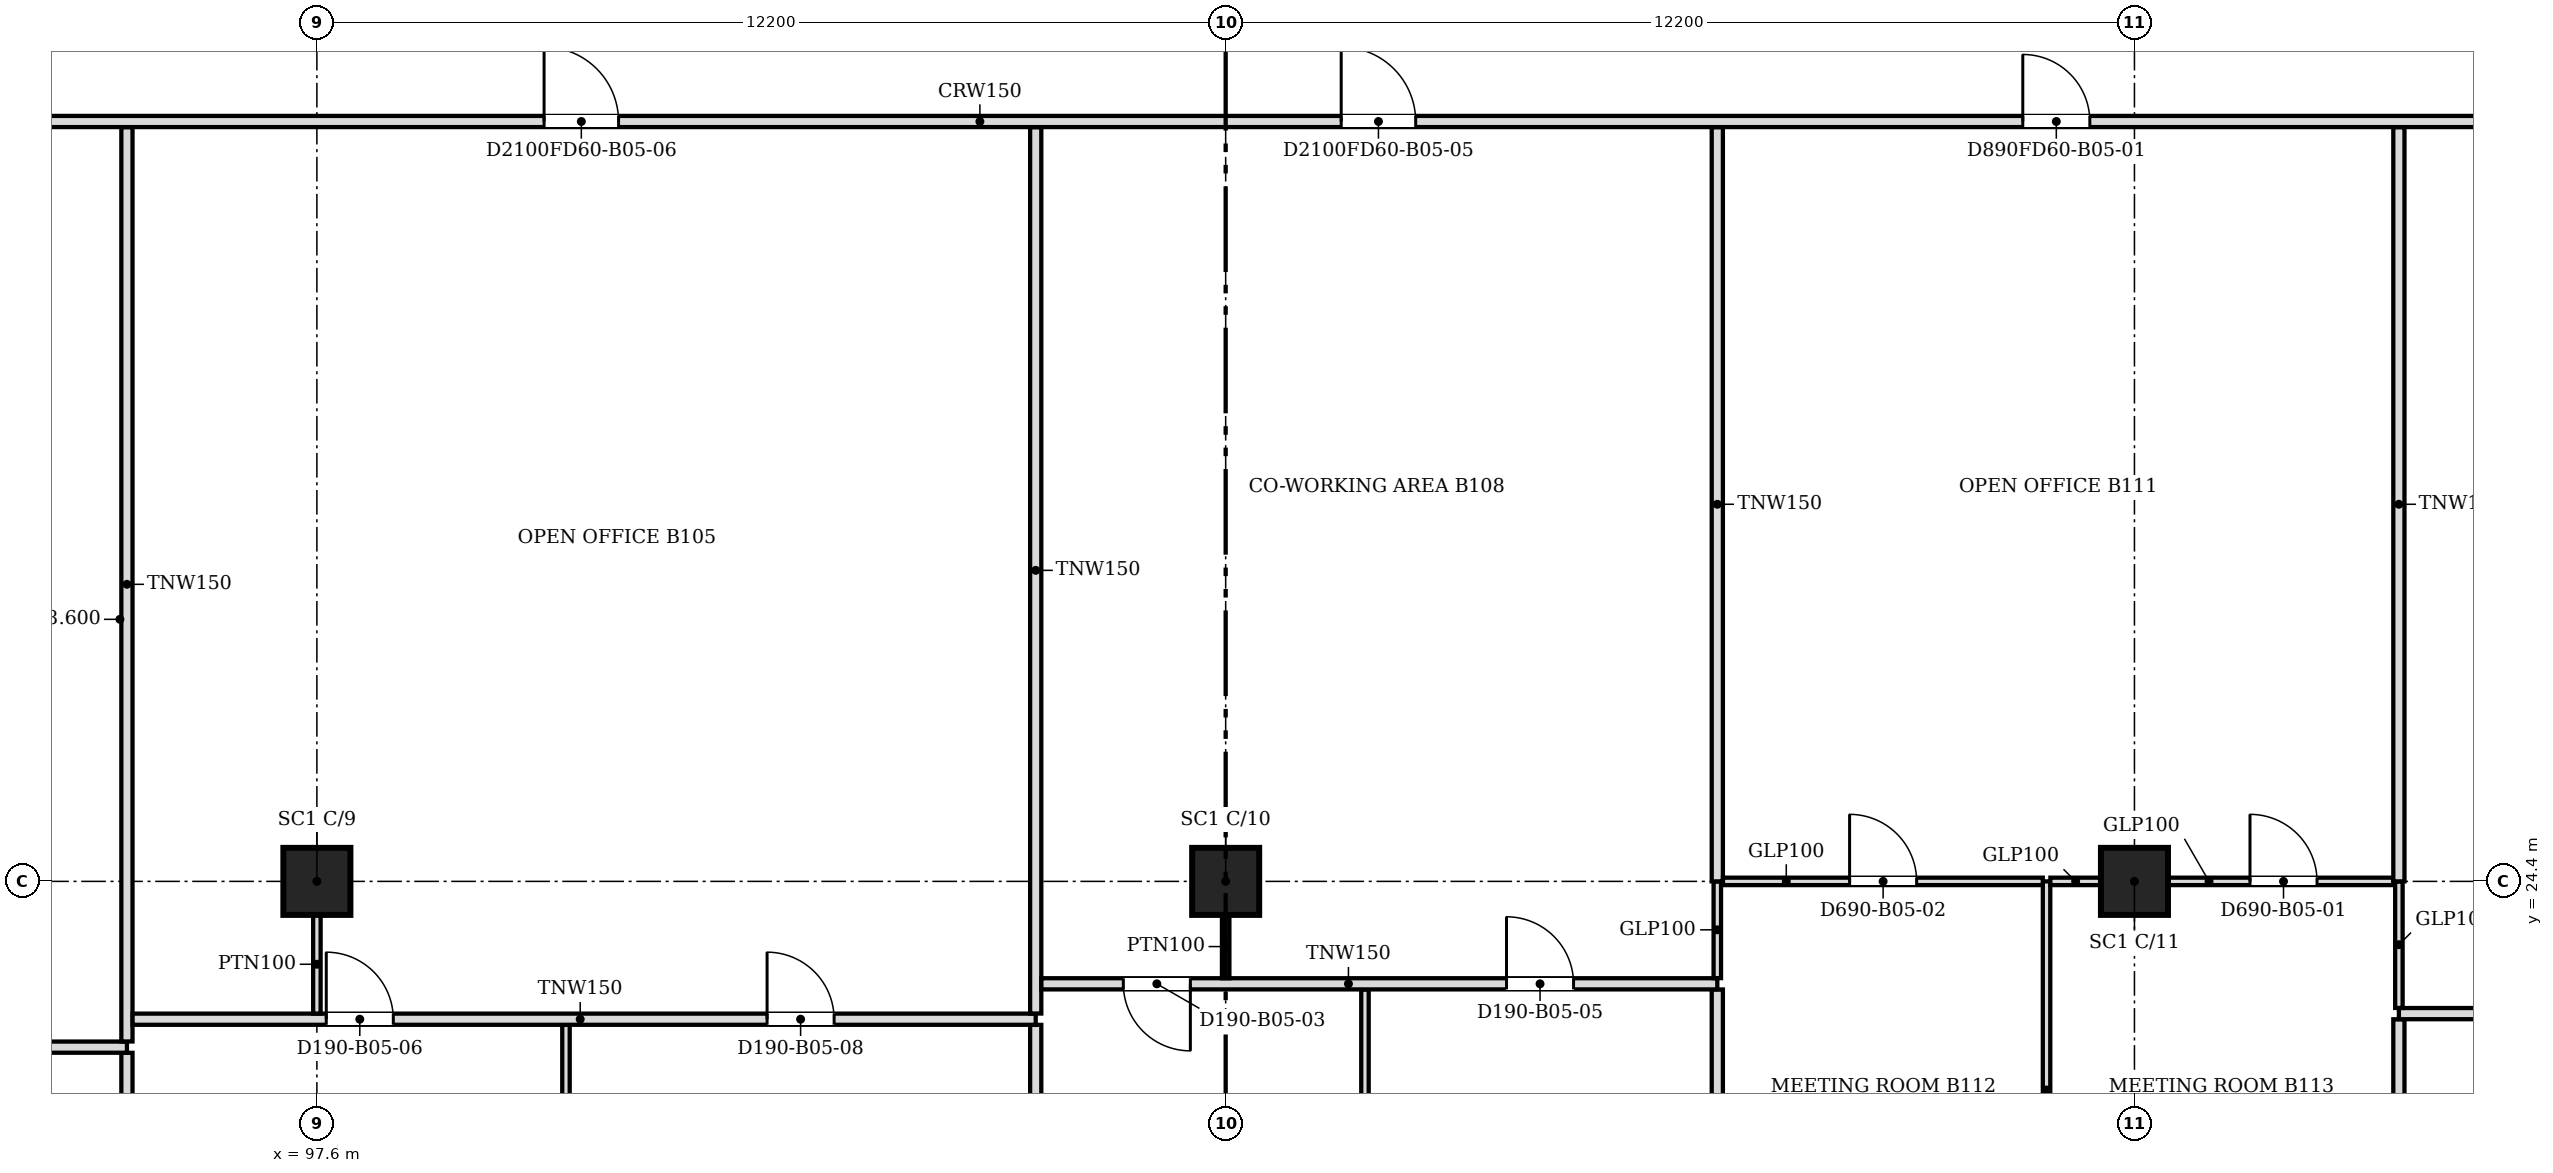
"""IFC4 building model, lengths in metres.
Left out: names, types, materials, properties, quantities, classifications, styles, units other than length and angle.
Written with IfcOpenShell. Run it as: python <this file> out.ifc"""

import sys

from ifc_helpers import new_model, si_unit, direction, frame, frame_2d, origin, origin_2d, place, context, subcontext, project, spatial, rectangle, extrude, source, transform, mapped, element, fill, save


model = new_model("IFC4")
c1 = context("Model", 3, precision=1e-05, world=origin(), true_north=direction((0.0, 1.0)))
c2 = subcontext(c1, "Body", "Model", "MODEL_VIEW")
j1 = project(units=[si_unit("LENGTHUNIT", "METRE"), si_unit("PLANEANGLEUNIT", "RADIAN")], contexts=[c1])
p1 = place(None, origin())
s1 = spatial("IfcSite", under=j1, at=p1, CompositionType="ELEMENT")
p2 = place(p1, origin())
s2 = spatial("IfcBuilding", under=s1, at=p2, CompositionType="ELEMENT")
p3 = place(p2, frame((0.0, 0.0, 48.6)))
s3 = spatial("IfcBuildingStorey", under=s2, at=p3, CompositionType="ELEMENT", Elevation=48.6)
for number, where, z_axis, x_axis in (
    (1, (97.6, 24.4, 0.0), (0.0, 0.0, 1.0), (1.0, 0.0, 0.0)),
    (2, (109.8, 24.4, 0.0), (0.0, 0.0, 1.0), (1.0, 0.0, 0.0)),
    (3, (122.0, 24.4, 0.0), (0.0, 0.0, 1.0), (1.0, 0.0, 0.0)),
):
    element("IfcColumn", number, at=place(p3, frame(where, z_axis=z_axis, x_axis=x_axis)), inside=s3, PredefinedType="COLUMN", context=c2, shape_type="SweptSolid", body=[
        extrude(rectangle(XDim=0.9, YDim=0.9, at=origin_2d()), origin(), (0.0, 0.0, 1.0), 3.6),
    ])
p4 = place(p3, frame((95.05, 18.8, 0.0), z_axis=(0.0, 0.0, 1.0), x_axis=(0.0, 1.0, 0.0)))
e4 = element("IfcWall", 4, at=p4, inside=s3, PredefinedType="PARTITIONING", context=c2, shape_type="SweptSolid", body=[
    extrude(rectangle(XDim=3.299, YDim=0.15, at=frame_2d((1.649, 0.0))), origin(), (0.0, 0.0, 1.0), 3.067),
])
p5 = place(p3, frame((100.944, 18.8, 0.0), z_axis=(0.0, 0.0, 1.0), x_axis=(0.0, 1.0, 0.0)))
e5 = element("IfcWall", 5, at=p5, inside=s3, PredefinedType="PARTITIONING", context=c2, shape_type="SweptSolid", body=[
    extrude(rectangle(XDim=3.674, YDim=0.1, at=frame_2d((1.837, 0.0))), origin(), (0.0, 0.0, 1.0), 3.067),
])
p6 = place(p3, frame((107.25, 18.8, 0.0), z_axis=(0.0, 0.0, 1.0), x_axis=(0.0, 1.0, 0.0)))
e6 = element("IfcWall", 6, at=p6, inside=s3, PredefinedType="PARTITIONING", context=c2, shape_type="SweptSolid", body=[
    extrude(rectangle(XDim=3.674, YDim=0.15, at=frame_2d((1.837, 0.0))), origin(), (0.0, 0.0, 1.0), 3.067),
])
p7 = place(p3, frame((111.67, 18.8, 0.0), z_axis=(0.0, 0.0, 1.0), x_axis=(0.0, 1.0, 0.0)))
e7 = element("IfcWall", 7, at=p7, inside=s3, PredefinedType="PARTITIONING", context=c2, shape_type="SweptSolid", body=[
    extrude(rectangle(XDim=4.149, YDim=0.1, at=frame_2d((2.074, 0.0))), origin(), (0.0, 0.0, 1.0), 3.067),
])
p8 = place(p3, frame((116.4, 18.8, 0.0), z_axis=(0.0, 0.0, 1.0), x_axis=(0.0, 1.0, 0.0)))
e8 = element("IfcWall", 8, at=p8, inside=s3, PredefinedType="PARTITIONING", context=c2, shape_type="SweptSolid", body=[
    extrude(rectangle(XDim=4.149, YDim=0.15, at=frame_2d((2.074, 0.0))), origin(), (0.0, 0.0, 1.0), 3.067),
])
p9 = place(p3, frame((120.82, 18.8, 0.0), z_axis=(0.0, 0.0, 1.0), x_axis=(0.0, 1.0, 0.0)))
e9 = element("IfcWall", 9, at=p9, inside=s3, PredefinedType="PARTITIONING", context=c2, shape_type="SweptSolid", body=[
    extrude(rectangle(XDim=5.6, YDim=0.1, at=frame_2d((2.8, 0.0))), origin(), (0.0, 0.0, 1.0), 3.067),
])
p10 = place(p3, frame((125.55, 18.8, 0.0), z_axis=(0.0, 0.0, 1.0), x_axis=(0.0, 1.0, 0.0)))
e10 = element("IfcWall", 10, at=p10, inside=s3, PredefinedType="PARTITIONING", context=c2, shape_type="SweptSolid", body=[
    extrude(rectangle(XDim=3.749, YDim=0.15, at=frame_2d((1.875, 0.0))), origin(), (0.0, 0.0, 1.0), 3.067),
])
p11 = place(p3, frame((95.05, 22.175, 0.0), z_axis=(0.0, 0.0, 1.0), x_axis=(-1.0, 0.0, 0.0)))
e11 = element("IfcWall", 11, at=p11, inside=s3, PredefinedType="PARTITIONING", context=c2, shape_type="SweptSolid", body=[
    extrude(rectangle(XDim=8.256, YDim=0.15, at=frame_2d((4.128, 0.0))), origin(), (0.0, 0.0, 1.0), 3.067),
])
m1 = source(origin(), c2, "Body", "SweptSolid", [
    extrude(rectangle(XDim=0.9, YDim=2.1, at=frame_2d((0.45, 1.05))), frame((0.0, 0.085, 0.0), z_axis=(0.0, -1.0, 0.0), x_axis=(1.0, 0.0, 0.0)), (0.0, 0.0, 1.0), 0.17),
])
p12 = place(p11, frame((6.056, 0.0, 0.0)))
e12 = element("IfcOpeningElement", 12, at=p12, cuts=e11, PredefinedType="OPENING", context=c2, shape_type="MappedRepresentation", body=[
    mapped(m1, transform((0.0, 0.0, 0.0), scale=1.0)),
])
p13 = place(p11, frame((1.93, 0.0, 0.0)))
e13 = element("IfcOpeningElement", 13, at=p13, cuts=e11, PredefinedType="OPENING", context=c2, shape_type="MappedRepresentation", body=[
    mapped(m1, transform((0.0, 0.0, 0.0), scale=1.0)),
])
p14 = place(p3, frame((95.05, 22.251, 0.0), z_axis=(0.0, 0.0, 1.0), x_axis=(0.0, 1.0, 0.0)))
e14 = element("IfcWall", 14, at=p14, inside=s3, PredefinedType="PARTITIONING", context=c2, shape_type="SweptSolid", body=[
    extrude(rectangle(XDim=12.273, YDim=0.15, at=frame_2d((6.136, 0.0))), origin(), (0.0, 0.0, 1.0), 3.067),
])
p15 = place(p3, frame((107.25, 22.55, 0.0), z_axis=(0.0, 0.0, 1.0), x_axis=(-1.0, 0.0, 0.0)))
e15 = element("IfcWall", 15, at=p15, inside=s3, PredefinedType="PARTITIONING", context=c2, shape_type="SweptSolid", body=[
    extrude(rectangle(XDim=12.124, YDim=0.15, at=frame_2d((6.062, 0.0))), origin(), (0.0, 0.0, 1.0), 3.067),
])
p16 = place(p15, frame((8.624, 0.0, 0.0)))
e16 = element("IfcOpeningElement", 16, at=p16, cuts=e15, PredefinedType="OPENING", context=c2, shape_type="MappedRepresentation", body=[
    mapped(m1, transform((0.0, 0.0, 0.0), scale=1.0)),
])
p17 = place(p15, frame((2.706, 0.0, 0.0)))
e17 = element("IfcOpeningElement", 17, at=p17, cuts=e15, PredefinedType="OPENING", context=c2, shape_type="MappedRepresentation", body=[
    mapped(m1, transform((0.0, 0.0, 0.0), scale=1.0)),
])
p18 = place(p3, frame((132.979, 22.625, 0.0), z_axis=(0.0, 0.0, 1.0), x_axis=(-1.0, 0.0, 0.0)))
e18 = element("IfcWall", 18, at=p18, inside=s3, PredefinedType="PARTITIONING", context=c2, shape_type="SweptSolid", body=[
    extrude(rectangle(XDim=7.429, YDim=0.15, at=frame_2d((3.715, 0.0))), origin(), (0.0, 0.0, 1.0), 3.067),
])
p19 = place(p18, frame((3.229, 0.0, 0.0)))
e19 = element("IfcOpeningElement", 19, at=p19, cuts=e18, PredefinedType="OPENING", context=c2, shape_type="MappedRepresentation", body=[
    mapped(m1, transform((0.0, 0.0, 0.0), scale=1.0)),
])
p20 = place(p3, frame((107.25, 22.626, 0.0), z_axis=(0.0, 0.0, 1.0), x_axis=(0.0, 1.0, 0.0)))
e20 = element("IfcWall", 20, at=p20, inside=s3, PredefinedType="PARTITIONING", context=c2, shape_type="SweptSolid", body=[
    extrude(rectangle(XDim=11.898, YDim=0.15, at=frame_2d((5.949, 0.0))), origin(), (0.0, 0.0, 1.0), 3.067),
])
p21 = place(p3, frame((125.55, 22.701, 0.0), z_axis=(0.0, 0.0, 1.0), x_axis=(0.0, 1.0, 0.0)))
e21 = element("IfcWall", 21, at=p21, inside=s3, PredefinedType="PARTITIONING", context=c2, shape_type="SweptSolid", body=[
    extrude(rectangle(XDim=1.698, YDim=0.1, at=frame_2d((0.849, 0.0))), origin(), (0.0, 0.0, 1.0), 3.067),
])
p22 = place(p3, frame((116.4, 23.025, 0.0), z_axis=(0.0, 0.0, 1.0), x_axis=(-1.0, 0.0, 0.0)))
e22 = element("IfcWall", 22, at=p22, inside=s3, PredefinedType="PARTITIONING", context=c2, shape_type="SweptSolid", body=[
    extrude(rectangle(XDim=9.074, YDim=0.15, at=frame_2d((4.537, 0.0))), origin(), (0.0, 0.0, 1.0), 3.067),
])
p23 = place(p22, frame((7.074, 0.0, 0.0)))
e23 = element("IfcOpeningElement", 23, at=p23, cuts=e22, PredefinedType="OPENING", context=c2, shape_type="MappedRepresentation", body=[
    mapped(m1, transform((0.0, 0.0, 0.0), scale=1.0)),
])
p24 = place(p22, frame((1.93, 0.0, 0.0)))
e24 = element("IfcOpeningElement", 24, at=p24, cuts=e22, PredefinedType="OPENING", context=c2, shape_type="MappedRepresentation", body=[
    mapped(m1, transform((0.0, 0.0, 0.0), scale=1.0)),
])
p25 = place(p3, frame((116.4, 23.101, 0.0), z_axis=(0.0, 0.0, 1.0), x_axis=(0.0, 1.0, 0.0)))
e25 = element("IfcWall", 25, at=p25, inside=s3, PredefinedType="PARTITIONING", context=c2, shape_type="SweptSolid", body=[
    extrude(rectangle(XDim=1.298, YDim=0.1, at=frame_2d((0.649, 0.0))), origin(), (0.0, 0.0, 1.0), 3.067),
])
p26 = place(p3, frame((97.6, 23.95, 0.0), z_axis=(0.0, 0.0, 1.0), x_axis=(0.0, -1.0, 0.0)))
e26 = element("IfcWall", 26, at=p26, inside=s3, PredefinedType="PARTITIONING", context=c2, shape_type="SweptSolid", body=[
    extrude(rectangle(XDim=1.325, YDim=0.1, at=frame_2d((0.663, 0.0))), origin(), (0.0, 0.0, 1.0), 3.067),
])
p27 = place(p3, frame((109.8, 23.95, 0.0), z_axis=(0.0, 0.0, 1.0), x_axis=(0.0, -1.0, 0.0)))
e27 = element("IfcWall", 27, at=p27, inside=s3, PredefinedType="PARTITIONING", context=c2, shape_type="SweptSolid", body=[
    extrude(rectangle(XDim=0.85, YDim=0.1, at=frame_2d((0.425, 0.0))), origin(), (0.0, 0.0, 1.0), 3.067),
])
p28 = place(p3, frame((116.4, 24.4, 0.0), z_axis=(0.0, 0.0, 1.0), x_axis=(0.0, 1.0, 0.0)))
e28 = element("IfcWall", 28, at=p28, inside=s3, PredefinedType="PARTITIONING", context=c2, shape_type="SweptSolid", body=[
    extrude(rectangle(XDim=10.124, YDim=0.15, at=frame_2d((5.062, 0.0))), origin(), (0.0, 0.0, 1.0), 3.067),
])
p29 = place(p3, frame((120.769, 24.4, 0.0), z_axis=(0.0, 0.0, 1.0), x_axis=(-1.0, 0.0, 0.0)))
e29 = element("IfcWall", 29, at=p29, inside=s3, PredefinedType="PARTITIONING", context=c2, shape_type="SweptSolid", body=[
    extrude(rectangle(XDim=4.293, YDim=0.1, at=frame_2d((2.146, 0.0))), origin(), (0.0, 0.0, 1.0), 3.067),
])
m2 = source(origin(), c2, "Body", "SweptSolid", [
    extrude(rectangle(XDim=0.9, YDim=2.1, at=frame_2d((0.45, 1.05))), frame((0.0, 0.06, 0.0), z_axis=(0.0, -1.0, 0.0), x_axis=(1.0, 0.0, 0.0)), (0.0, 0.0, 1.0), 0.12),
])
p30 = place(p29, frame((1.693, 0.0, 0.0)))
e30 = element("IfcOpeningElement", 30, at=p30, cuts=e29, PredefinedType="OPENING", context=c2, shape_type="MappedRepresentation", body=[
    mapped(m2, transform((0.0, 0.0, 0.0), scale=1.0)),
])
p31 = place(p3, frame((120.871, 24.4, 0.0), z_axis=(0.0, 0.0, 1.0), x_axis=(1.0, 0.0, 0.0)))
e31 = element("IfcWall", 31, at=p31, inside=s3, PredefinedType="PARTITIONING", context=c2, shape_type="SweptSolid", body=[
    extrude(rectangle(XDim=0.678, YDim=0.1, at=frame_2d((0.339, 0.0))), origin(), (0.0, 0.0, 1.0), 3.067),
])
p32 = place(p3, frame((125.474, 24.4, 0.0), z_axis=(0.0, 0.0, 1.0), x_axis=(-1.0, 0.0, 0.0)))
e32 = element("IfcWall", 32, at=p32, inside=s3, PredefinedType="PARTITIONING", context=c2, shape_type="SweptSolid", body=[
    extrude(rectangle(XDim=3.023, YDim=0.1, at=frame_2d((1.512, 0.0))), origin(), (0.0, 0.0, 1.0), 3.067),
])
p33 = place(p32, frame((1.023, 0.0, 0.0)))
e33 = element("IfcOpeningElement", 33, at=p33, cuts=e32, PredefinedType="OPENING", context=c2, shape_type="MappedRepresentation", body=[
    mapped(m2, transform((0.0, 0.0, 0.0), scale=1.0)),
])
p34 = place(p3, frame((125.55, 24.4, 0.0), z_axis=(0.0, 0.0, 1.0), x_axis=(0.0, 1.0, 0.0)))
e34 = element("IfcWall", 34, at=p34, inside=s3, PredefinedType="PARTITIONING", context=c2, shape_type="SweptSolid", body=[
    extrude(rectangle(XDim=10.124, YDim=0.15, at=frame_2d((5.062, 0.0))), origin(), (0.0, 0.0, 1.0), 3.067),
])
p35 = place(p3, frame((133.7, 34.6, 0.0), z_axis=(0.0, 0.0, 1.0), x_axis=(-1.0, 0.0, 0.0)))
e35 = element("IfcWall", 35, at=p35, inside=s3, PredefinedType="PARTITIONING", context=c2, shape_type="SweptSolid", body=[
    extrude(rectangle(XDim=47.8, YDim=0.15, at=frame_2d((23.9, 0.0))), origin(), (0.0, 0.0, 1.0), 3.067),
])
m3 = source(origin(), c2, "Body", "SweptSolid", [
    extrude(rectangle(XDim=1.0, YDim=2.1, at=frame_2d((0.5, 1.05))), frame((0.0, 0.085, 0.0), z_axis=(0.0, -1.0, 0.0), x_axis=(1.0, 0.0, 0.0)), (0.0, 0.0, 1.0), 0.17),
])
p36 = place(p35, frame((3.549, 0.0, 0.0)))
e36 = element("IfcOpeningElement", 36, at=p36, cuts=e35, PredefinedType="OPENING", context=c2, shape_type="MappedRepresentation", body=[
    mapped(m3, transform((0.0, 0.0, 0.0), scale=1.0)),
])
p37 = place(p35, frame((42.7, 0.0, 0.0)))
e37 = element("IfcOpeningElement", 37, at=p37, cuts=e35, PredefinedType="OPENING", context=c2, shape_type="MappedRepresentation", body=[
    mapped(m3, transform((0.0, 0.0, 0.0), scale=1.0)),
])
p38 = place(p35, frame((12.299, 0.0, 0.0)))
e38 = element("IfcOpeningElement", 38, at=p38, cuts=e35, PredefinedType="OPENING", context=c2, shape_type="MappedRepresentation", body=[
    mapped(m1, transform((0.0, 0.0, 0.0), scale=1.0)),
])
p39 = place(p35, frame((21.349, 0.0, 0.0)))
e39 = element("IfcOpeningElement", 39, at=p39, cuts=e35, PredefinedType="OPENING", context=c2, shape_type="MappedRepresentation", body=[
    mapped(m3, transform((0.0, 0.0, 0.0), scale=1.0)),
])
p40 = place(p35, frame((32.05, 0.0, 0.0)))
e40 = element("IfcOpeningElement", 40, at=p40, cuts=e35, PredefinedType="OPENING", context=c2, shape_type="MappedRepresentation", body=[
    mapped(m3, transform((0.0, 0.0, 0.0), scale=1.0)),
])
m4 = source(origin(), c2, "Body", "SweptSolid", [
    extrude(rectangle(XDim=0.9, YDim=2.1, at=frame_2d((0.45, 1.05))), frame((0.0, 0.025, 0.0), z_axis=(0.0, -1.0, 0.0), x_axis=(1.0, 0.0, 0.0)), (0.0, 0.0, 1.0), 0.05),
])
p41 = place(p33, origin())
e41 = element("IfcDoor", 41, at=p41, inside=s3, OperationType="SINGLE_SWING_RIGHT", PredefinedType="DOOR", context=c2, shape_type="MappedRepresentation", body=[
    mapped(m4, transform((0.0, 0.0, 0.0), scale=1.0)),
])
fill(e33, e41)
p42 = place(p30, origin())
e42 = element("IfcDoor", 42, at=p42, inside=s3, OperationType="SINGLE_SWING_RIGHT", PredefinedType="DOOR", context=c2, shape_type="MappedRepresentation", body=[
    mapped(m4, transform((0.0, 0.0, 0.0), scale=1.0)),
])
fill(e30, e42)
p43 = place(p23, origin())
e43 = element("IfcDoor", 43, at=p43, inside=s3, OperationType="SINGLE_SWING_LEFT", PredefinedType="DOOR", context=c2, shape_type="MappedRepresentation", body=[
    mapped(m4, transform((0.0, 0.0, 0.0), scale=1.0)),
])
fill(e23, e43)
p44 = place(p24, origin())
e44 = element("IfcDoor", 44, at=p44, inside=s3, OperationType="SINGLE_SWING_RIGHT", PredefinedType="DOOR", context=c2, shape_type="MappedRepresentation", body=[
    mapped(m4, transform((0.0, 0.0, 0.0), scale=1.0)),
])
fill(e24, e44)
p45 = place(p16, origin())
e45 = element("IfcDoor", 45, at=p45, inside=s3, OperationType="SINGLE_SWING_RIGHT", PredefinedType="DOOR", context=c2, shape_type="MappedRepresentation", body=[
    mapped(m4, transform((0.0, 0.0, 0.0), scale=1.0)),
])
fill(e16, e45)
p46 = place(p17, origin())
e46 = element("IfcDoor", 46, at=p46, inside=s3, OperationType="SINGLE_SWING_RIGHT", PredefinedType="DOOR", context=c2, shape_type="MappedRepresentation", body=[
    mapped(m4, transform((0.0, 0.0, 0.0), scale=1.0)),
])
fill(e17, e46)
p47 = place(p38, origin())
e47 = element("IfcDoor", 47, at=p47, inside=s3, OperationType="SINGLE_SWING_RIGHT", PredefinedType="DOOR", context=c2, shape_type="MappedRepresentation", body=[
    mapped(m4, transform((0.0, 0.0, 0.0), scale=1.0)),
])
fill(e38, e47)
m5 = source(origin(), c2, "Body", "SweptSolid", [
    extrude(rectangle(XDim=1.0, YDim=2.1, at=frame_2d((0.5, 1.05))), frame((0.0, 0.025, 0.0), z_axis=(0.0, -1.0, 0.0), x_axis=(1.0, 0.0, 0.0)), (0.0, 0.0, 1.0), 0.05),
])
p48 = place(p39, origin())
e48 = element("IfcDoor", 48, at=p48, inside=s3, OperationType="SINGLE_SWING_RIGHT", PredefinedType="DOOR", context=c2, shape_type="MappedRepresentation", body=[
    mapped(m5, transform((0.0, 0.0, 0.0), scale=1.0)),
])
fill(e39, e48)
p49 = place(p40, origin())
e49 = element("IfcDoor", 49, at=p49, inside=s3, OperationType="SINGLE_SWING_RIGHT", PredefinedType="DOOR", context=c2, shape_type="MappedRepresentation", body=[
    mapped(m5, transform((0.0, 0.0, 0.0), scale=1.0)),
])
fill(e40, e49)
save(model, sys.argv[1])
